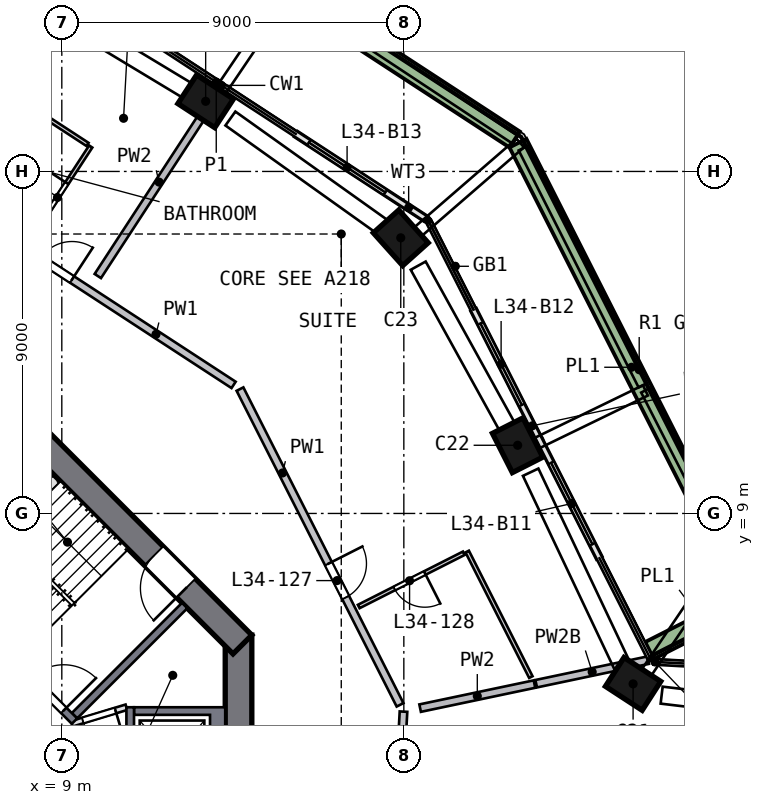
"""IFC4 building model, lengths in metres.
Left out: names, types, materials, properties, quantities, classifications, styles, units other than length and angle.
Written with IfcOpenShell. Run it as: python <this file> out.ifc"""

import sys

from ifc_helpers import new_model, si_unit, direction, frame, frame_2d, origin, origin_2d, place, context, subcontext, project, spatial, polyline, rectangle, outline, extrude, element, fill, save


model = new_model("IFC4")
c1 = context("Model", 3, precision=1e-05, world=origin(), true_north=direction((0.0, 1.0)))
c2 = subcontext(c1, "Body", "Model", "MODEL_VIEW")
j1 = project(units=[si_unit("LENGTHUNIT", "METRE"), si_unit("PLANEANGLEUNIT", "RADIAN")], contexts=[c1])
p1 = place(None, origin())
s1 = spatial("IfcSite", under=j1, at=p1, CompositionType="ELEMENT")
p2 = place(p1, origin())
s2 = spatial("IfcBuilding", under=s1, at=p2, CompositionType="ELEMENT")
p3 = place(p2, frame((0.0, 0.0, 143.5)))
s3 = spatial("IfcBuildingStorey", under=s2, at=p3, CompositionType="ELEMENT", Elevation=143.5)
p4 = place(p3, frame((24.059, 4.377, 0.0), z_axis=(-0.021740335, 0.11425078, 0.993214034), x_axis=(0.838339949, -0.539190255, 0.080374114)))
e1 = element("IfcColumn", 1, at=p4, inside=s3, PredefinedType="COLUMN", context=c2, shape_type="SweptSolid", body=[
    extrude(rectangle(XDim=1.15, YDim=0.9, at=origin_2d()), origin(), (0.0, 0.0, 1.0), 3.212),
])
p5 = place(p3, frame((21.058, 10.674, 0.0), z_axis=(-0.051637931, 0.099777564, 0.99366894), x_axis=(-0.449211123, 0.88633415, -0.112343851)))
e2 = element("IfcColumn", 2, at=p5, inside=s3, PredefinedType="COLUMN", context=c2, shape_type="SweptSolid", body=[
    extrude(rectangle(XDim=1.15, YDim=0.9, at=origin_2d()), origin(), (0.0, 0.0, 1.0), 3.21),
])
p6 = place(p3, frame((18.012, 16.15, 0.0), z_axis=(-0.077471201, 0.084997843, 0.993364777), x_axis=(0.662900147, -0.739822895, 0.115002085)))
e3 = element("IfcColumn", 3, at=p6, inside=s3, PredefinedType="COLUMN", context=c2, shape_type="SweptSolid", body=[
    extrude(rectangle(XDim=1.15, YDim=0.9, at=origin_2d()), origin(), (0.0, 0.0, 1.0), 3.211),
])
p7 = place(p3, frame((12.899, 19.773, 0.0), z_axis=(-0.094531133, 0.060536429, 0.993679629), x_axis=(-0.832224418, 0.54295729, -0.112249269)))
e4 = element("IfcColumn", 4, at=p7, inside=s3, PredefinedType="COLUMN", context=c2, shape_type="SweptSolid", body=[
    extrude(rectangle(XDim=1.15, YDim=0.9, at=origin_2d()), origin(), (0.0, 0.0, 1.0), 3.21),
])
p8 = place(p3, frame((13.65, -5.799, 0.0), z_axis=(0.0, 0.0, 1.0), x_axis=(0.0, 1.0, 0.0)))
e5 = element("IfcWall", 5, at=p8, inside=s3, PredefinedType="SHEAR", context=c2, shape_type="SweptSolid", body=[
    extrude(rectangle(XDim=11.598, YDim=0.7, at=frame_2d((5.799, 0.0))), origin(), (0.0, 0.0, 1.0), 3.5),
])
p9 = place(p8, frame((4.899, 0.0, 0.0)))
e6 = element("IfcOpeningElement", 6, at=p9, cuts=e5, PredefinedType="OPENING", context=c2, shape_type="SweptSolid", body=[
    extrude(rectangle(XDim=1.8, YDim=2.1, at=frame_2d((0.9, 1.05))), frame((0.0, 0.36, 0.0), z_axis=(0.0, -1.0, 0.0), x_axis=(1.0, 0.0, 0.0)), (0.0, 0.0, 1.0), 0.72),
])
p10 = place(p3, frame((13.752, 5.552, 0.0), z_axis=(0.0, 0.0, 1.0), x_axis=(-0.707106781, 0.707106781, 0.0)))
e7 = element("IfcWall", 7, at=p10, inside=s3, PredefinedType="SHEAR", context=c2, shape_type="SweptSolid", body=[
    extrude(rectangle(XDim=11.598, YDim=0.7, at=frame_2d((5.799, 0.0))), origin(), (0.0, 0.0, 1.0), 3.5),
])
p11 = place(p10, frame((2.099, 0.0, 0.0)))
e8 = element("IfcOpeningElement", 8, at=p11, cuts=e7, PredefinedType="OPENING", context=c2, shape_type="SweptSolid", body=[
    extrude(rectangle(XDim=1.2, YDim=2.1, at=frame_2d((0.6, 1.05))), frame((0.0, 0.36, 0.0), z_axis=(0.0, -1.0, 0.0), x_axis=(1.0, 0.0, 0.0)), (0.0, 0.0, 1.0), 0.72),
])
p12 = place(p3, frame((23.142, 7.834, 0.0), z_axis=(0.0, 0.0, 1.0), x_axis=(-0.452096723, 0.891968919, 0.0)))
e9 = element("IfcWall", 9, at=p12, inside=s3, PredefinedType="SOLIDWALL", context=c2, shape_type="SweptSolid", body=[
    extrude(rectangle(XDim=3.475, YDim=0.15, at=frame_2d((1.738, 0.0))), origin(), (0.0, 0.0, 1.0), 2.475),
])
p13 = place(p12, frame((0.4, 0.0, 0.0)))
e10 = element("IfcOpeningElement", 10, at=p13, cuts=e9, PredefinedType="OPENING", context=c2, shape_type="SweptSolid", body=[
    extrude(rectangle(XDim=2.4, YDim=2.4, at=frame_2d((1.2, 1.2))), frame((0.0, 0.085, 0.0), z_axis=(0.0, -1.0, 0.0), x_axis=(1.0, 0.0, 0.0)), (0.0, 0.0, 1.0), 0.17),
])
p14 = place(p3, frame((21.571, 10.934, 0.0), z_axis=(0.0, 0.0, 1.0), x_axis=(-0.452120787, 0.891956722, 0.0)))
e11 = element("IfcWall", 11, at=p14, inside=s3, PredefinedType="SOLIDWALL", context=c2, shape_type="SweptSolid", body=[
    extrude(rectangle(XDim=3.835, YDim=0.15, at=frame_2d((1.918, 0.0))), origin(), (0.0, 0.0, 1.0), 2.475),
])
p15 = place(p14, frame((1.035, 0.0, 0.0)))
e12 = element("IfcOpeningElement", 12, at=p15, cuts=e11, PredefinedType="OPENING", context=c2, shape_type="SweptSolid", body=[
    extrude(rectangle(XDim=2.4, YDim=2.4, at=frame_2d((1.2, 1.2))), frame((0.0, 0.085, 0.0), z_axis=(0.0, -1.0, 0.0), x_axis=(1.0, 0.0, 0.0)), (0.0, 0.0, 1.0), 0.17),
])
p16 = place(p3, frame((18.574, 16.757, 0.0), z_axis=(0.0, 0.0, 1.0), x_axis=(-0.837530592, 0.546390434, 0.0)))
e13 = element("IfcWall", 13, at=p16, inside=s3, PredefinedType="SOLIDWALL", context=c2, shape_type="SweptSolid", body=[
    extrude(rectangle(XDim=4.068, YDim=0.15, at=frame_2d((2.034, 0.0))), origin(), (0.0, 0.0, 1.0), 2.475),
])
p17 = place(p16, frame((1.268, 0.0, 0.0)))
e14 = element("IfcOpeningElement", 14, at=p17, cuts=e13, PredefinedType="OPENING", context=c2, shape_type="SweptSolid", body=[
    extrude(rectangle(XDim=2.4, YDim=2.4, at=frame_2d((1.2, 1.2))), frame((0.0, 0.085, 0.0), z_axis=(0.0, -1.0, 0.0), x_axis=(1.0, 0.0, 0.0)), (0.0, 0.0, 1.0), 0.17),
])
p18 = place(p3, frame((24.464, 5.394, 0.0), z_axis=(0.0, 0.0, 1.0), x_axis=(0.89195617, 0.452121875, 0.0)))
e15 = element("IfcWall", 15, at=p18, inside=s3, PredefinedType="SOLIDWALL", context=c2, shape_type="SweptSolid", body=[
    extrude(rectangle(XDim=3.199, YDim=0.5, at=frame_2d((1.6, 0.0))), origin(), (0.0, 0.0, 1.0), 0.7),
])
p19 = place(p3, frame((26.981, 6.95, 0.0), z_axis=(0.0, 0.0, 1.0), x_axis=(-0.452125212, 0.891954479, 0.0)))
e16 = element("IfcWall", 16, at=p19, inside=s3, PredefinedType="SOLIDWALL", context=c2, shape_type="SweptSolid", body=[
    extrude(rectangle(XDim=13.224, YDim=0.5, at=frame_2d((6.612, 0.0))), origin(), (0.0, 0.0, 1.0), 0.7),
])
p20 = place(p3, frame((20.916, 18.841, 0.0), z_axis=(0.0, 0.0, 1.0), x_axis=(-0.837521399, 0.546404526, 0.0)))
e17 = element("IfcWall", 17, at=p20, inside=s3, PredefinedType="SOLIDWALL", context=c2, shape_type="SweptSolid", body=[
    extrude(rectangle(XDim=13.723, YDim=0.5, at=frame_2d((6.862, 0.0))), origin(), (0.0, 0.0, 1.0), 0.7),
])
p21 = place(p3, origin())
e18 = element("IfcWall", 18, at=p21, inside=s3, PredefinedType="SOLIDWALL", context=c2, shape_type="SweptSolid", body=[
    extrude(outline(polyline([(13.3, 3.9), (13.3, 1.2), (10.9, 1.2), (10.9, 1.4), (12.9, 1.4), (12.9, 3.7), (10.9, 3.7), (10.9, 3.9), (13.3, 3.9)])), origin(), (0.0, 0.0, 1.0), 3.19),
])
p22 = place(p3, frame((10.8, 1.2, 0.0), z_axis=(0.0, 0.0, 1.0), x_axis=(0.0, 1.0, 0.0)))
e19 = element("IfcWall", 19, at=p22, inside=s3, PredefinedType="SOLIDWALL", context=c2, shape_type="SweptSolid", body=[
    extrude(rectangle(XDim=2.7, YDim=0.2, at=frame_2d((1.35, 0.0))), origin(), (0.0, 0.0, 1.0), 3.19),
])
p23 = place(p22, frame((0.75, 0.0, 0.0)))
e20 = element("IfcOpeningElement", 20, at=p23, cuts=e19, PredefinedType="OPENING", context=c2, shape_type="SweptSolid", body=[
    extrude(rectangle(XDim=1.2, YDim=2.1, at=frame_2d((0.6, 1.05))), frame((0.0, 0.11, 0.0), z_axis=(0.0, -1.0, 0.0), x_axis=(1.0, 0.0, 0.0)), (0.0, 0.0, 1.0), 0.22),
])
p24 = place(p3, frame((3.535, 9.334, 0.0), z_axis=(0.0, 0.0, 1.0), x_axis=(0.707106781, -0.707106781, 0.0)))
e21 = element("IfcWall", 21, at=p24, inside=s3, PredefinedType="SOLIDWALL", context=c2, shape_type="SweptSolid", body=[
    extrude(rectangle(XDim=8.2, YDim=0.2, at=frame_2d((4.1, 0.0))), origin(), (0.0, 0.0, 1.0), 3.19),
])
p25 = place(p24, frame((6.6, 0.0, 0.0)))
e22 = element("IfcOpeningElement", 22, at=p25, cuts=e21, PredefinedType="OPENING", context=c2, shape_type="SweptSolid", body=[
    extrude(rectangle(XDim=1.2, YDim=2.1, at=frame_2d((0.6, 1.05))), frame((0.0, 0.11, 0.0), z_axis=(0.0, -1.0, 0.0), x_axis=(1.0, 0.0, 0.0)), (0.0, 0.0, 1.0), 0.22),
])
p26 = place(p3, frame((9.334, 3.677, 0.0), z_axis=(0.0, 0.0, 1.0), x_axis=(0.707106781, 0.707106781, 0.0)))
e23 = element("IfcWall", 23, at=p26, inside=s3, PredefinedType="SOLIDWALL", context=c2, shape_type="SweptSolid", body=[
    extrude(rectangle(XDim=4.1, YDim=0.2, at=frame_2d((2.05, 0.0))), origin(), (0.0, 0.0, 1.0), 3.19),
])
p27 = place(p3, frame((10.7, 3.9, 0.0), z_axis=(0.0, 0.0, 1.0), x_axis=(-0.957084567, -0.289808785, 0.0)))
e24 = element("IfcWall", 24, at=p27, inside=s3, PredefinedType="PARTITIONING", context=c2, shape_type="SweptSolid", body=[
    extrude(rectangle(XDim=1.501, YDim=0.15, at=frame_2d((0.75, 0.0))), origin(), (0.0, 0.0, 1.0), 3.19),
])
p28 = place(p27, frame((0.301, 0.0, 0.0)))
e25 = element("IfcOpeningElement", 25, at=p28, cuts=e24, PredefinedType="OPENING", context=c2, shape_type="SweptSolid", body=[
    extrude(rectangle(XDim=0.9, YDim=2.1, at=frame_2d((0.45, 1.05))), frame((0.0, 0.085, 0.0), z_axis=(0.0, -1.0, 0.0), x_axis=(1.0, 0.0, 0.0)), (0.0, 0.0, 1.0), 0.17),
])
p29 = place(p3, frame((5.701, 17.484, 0.0), z_axis=(0.0, 0.0, 1.0), x_axis=(0.83752891, -0.546393013, 0.0)))
e26 = element("IfcWall", 26, at=p29, inside=s3, PredefinedType="SOLIDWALL", context=c2, shape_type="SweptSolid", body=[
    extrude(rectangle(XDim=9.336, YDim=0.2, at=frame_2d((4.668, 0.0))), origin(), (0.0, 0.0, 1.0), 3.19),
])
p30 = place(p29, frame((3.26, 0.0, 0.0)))
e27 = element("IfcOpeningElement", 27, at=p30, cuts=e26, PredefinedType="OPENING", context=c2, shape_type="SweptSolid", body=[
    extrude(rectangle(XDim=1.0, YDim=2.1, at=frame_2d((0.5, 1.05))), frame((0.0, 0.11, 0.0), z_axis=(0.0, -1.0, 0.0), x_axis=(1.0, 0.0, 0.0)), (0.0, 0.0, 1.0), 0.22),
])
p31 = place(p3, frame((13.688, 12.273, 0.0), z_axis=(0.0, 0.0, 1.0), x_axis=(0.452112705, -0.891960818, 0.0)))
e28 = element("IfcWall", 28, at=p31, inside=s3, PredefinedType="SOLIDWALL", context=c2, shape_type="SweptSolid", body=[
    extrude(rectangle(XDim=9.316, YDim=0.2, at=frame_2d((4.658, 0.0))), origin(), (0.0, 0.0, 1.0), 3.19),
])
p32 = place(p31, frame((5.15, 0.0, 0.0)))
e29 = element("IfcOpeningElement", 29, at=p32, cuts=e28, PredefinedType="OPENING", context=c2, shape_type="SweptSolid", body=[
    extrude(rectangle(XDim=1.0, YDim=2.1, at=frame_2d((0.5, 1.05))), frame((0.0, 0.11, 0.0), z_axis=(0.0, -1.0, 0.0), x_axis=(1.0, 0.0, 0.0)), (0.0, 0.0, 1.0), 0.22),
])
p33 = place(p3, frame((17.803, 0.332, 0.0), z_axis=(0.0, 0.0, 1.0), x_axis=(0.054429939, 0.998517592, 0.0)))
e30 = element("IfcWall", 30, at=p33, inside=s3, PredefinedType="SOLIDWALL", context=c2, shape_type="SweptSolid", body=[
    extrude(rectangle(XDim=3.458, YDim=0.2, at=frame_2d((1.729, 0.0))), origin(), (0.0, 0.0, 1.0), 3.19),
])
p34 = place(p3, frame((9.948, 15.248, 0.0), z_axis=(0.0, 0.0, 1.0), x_axis=(0.546387636, 0.837532418, 0.0)))
e31 = element("IfcWall", 31, at=p34, inside=s3, PredefinedType="SOLIDWALL", context=c2, shape_type="SweptSolid", body=[
    extrude(rectangle(XDim=5.903, YDim=0.2, at=frame_2d((2.951, 0.0))), origin(), (0.0, 0.0, 1.0), 3.19),
])
p35 = place(p3, frame((18.429, 3.877, 0.0), z_axis=(0.0, 0.0, 1.0), x_axis=(0.97857421, 0.205894428, 0.0)))
e32 = element("IfcWall", 32, at=p35, inside=s3, PredefinedType="SOLIDWALL", context=c2, shape_type="SweptSolid", body=[
    extrude(rectangle(XDim=3.075, YDim=0.2, at=frame_2d((1.537, 0.0))), origin(), (0.0, 0.0, 1.0), 3.19),
])
p36 = place(p3, frame((21.482, 4.519, 0.0), z_axis=(0.0, 0.0, 1.0), x_axis=(0.978586756, 0.205834792, 0.0)))
e33 = element("IfcWall", 33, at=p36, inside=s3, PredefinedType="SOLIDWALL", context=c2, shape_type="SweptSolid", body=[
    extrude(rectangle(XDim=3.011, YDim=0.2, at=frame_2d((1.506, 0.0))), origin(), (0.0, 0.0, 1.0), 2.69),
])
p37 = place(p3, frame((7.586, 20.075, 0.0), z_axis=(0.0, 0.0, 1.0), x_axis=(0.837560013, -0.546345335, 0.0)))
e34 = element("IfcWall", 34, at=p37, inside=s3, PredefinedType="PARTITIONING", context=c2, shape_type="SweptSolid", body=[
    extrude(rectangle(XDim=2.497, YDim=0.1, at=frame_2d((1.248, 0.0))), origin(), (0.0, 0.0, 1.0), 3.19),
])
p38 = place(p3, frame((8.122, 16.143, 0.0), z_axis=(0.0, 0.0, 1.0), x_axis=(0.546372035, 0.837542595, 0.0)))
e35 = element("IfcWall", 35, at=p38, inside=s3, PredefinedType="PARTITIONING", context=c2, shape_type="SweptSolid", body=[
    extrude(rectangle(XDim=3.0, YDim=0.1, at=frame_2d((1.5, 0.0))), origin(), (0.0, 0.0, 1.0), 3.19),
])
p39 = place(p38, frame((0.95, 0.0, 0.0)))
e36 = element("IfcOpeningElement", 36, at=p39, cuts=e35, PredefinedType="OPENING", context=c2, shape_type="SweptSolid", body=[
    extrude(rectangle(XDim=0.9, YDim=2.1, at=frame_2d((0.45, 1.05))), frame((0.0, 0.06, 0.0), z_axis=(0.0, -1.0, 0.0), x_axis=(1.0, 0.0, 0.0)), (0.0, 0.0, 1.0), 0.12),
])
p40 = place(p3, frame((19.578, 7.953, 0.0), z_axis=(0.0, 0.0, 1.0), x_axis=(-0.891956597, -0.452121033, 0.0)))
e37 = element("IfcWall", 37, at=p40, inside=s3, PredefinedType="PARTITIONING", context=c2, shape_type="SweptSolid", body=[
    extrude(rectangle(XDim=3.1, YDim=0.1, at=frame_2d((1.55, 0.0))), origin(), (0.0, 0.0, 1.0), 3.19),
])
p41 = place(p40, frame((1.15, 0.0, 0.0)))
e38 = element("IfcOpeningElement", 38, at=p41, cuts=e37, PredefinedType="OPENING", context=c2, shape_type="SweptSolid", body=[
    extrude(rectangle(XDim=0.9, YDim=2.1, at=frame_2d((0.45, 1.05))), frame((0.0, 0.06, 0.0), z_axis=(0.0, -1.0, 0.0), x_axis=(1.0, 0.0, 0.0)), (0.0, 0.0, 1.0), 0.12),
])
p42 = place(p3, frame((19.667, 7.998, 0.0), z_axis=(0.0, 0.0, 1.0), x_axis=(0.452110949, -0.891961709, 0.0)))
e39 = element("IfcWall", 39, at=p42, inside=s3, PredefinedType="PARTITIONING", context=c2, shape_type="SweptSolid", body=[
    extrude(rectangle(XDim=3.704, YDim=0.1, at=frame_2d((1.852, 0.0))), origin(), (0.0, 0.0, 1.0), 3.19),
])
p43 = place(p13, origin())
e40 = element("IfcDoor", 40, at=p43, inside=s3, OperationType="SLIDING_TO_RIGHT", PredefinedType="DOOR", context=c2, shape_type="SweptSolid", body=[
    extrude(rectangle(XDim=2.4, YDim=2.4, at=frame_2d((1.2, 1.2))), frame((0.0, 0.025, 0.0), z_axis=(0.0, -1.0, 0.0), x_axis=(1.0, 0.0, 0.0)), (0.0, 0.0, 1.0), 0.05),
])
fill(e10, e40)
p44 = place(p15, origin())
e41 = element("IfcDoor", 41, at=p44, inside=s3, OperationType="SLIDING_TO_LEFT", PredefinedType="DOOR", context=c2, shape_type="SweptSolid", body=[
    extrude(rectangle(XDim=2.4, YDim=2.4, at=frame_2d((1.2, 1.2))), frame((0.0, 0.025, 0.0), z_axis=(0.0, -1.0, 0.0), x_axis=(1.0, 0.0, 0.0)), (0.0, 0.0, 1.0), 0.05),
])
fill(e12, e41)
p45 = place(p17, origin())
e42 = element("IfcDoor", 42, at=p45, inside=s3, OperationType="SLIDING_TO_LEFT", PredefinedType="DOOR", context=c2, shape_type="SweptSolid", body=[
    extrude(rectangle(XDim=2.4, YDim=2.4, at=frame_2d((1.2, 1.2))), frame((0.0, 0.025, 0.0), z_axis=(0.0, -1.0, 0.0), x_axis=(1.0, 0.0, 0.0)), (0.0, 0.0, 1.0), 0.05),
])
fill(e14, e42)
p46 = place(p25, origin())
e43 = element("IfcDoor", 43, at=p46, inside=s3, OperationType="SINGLE_SWING_RIGHT", PredefinedType="DOOR", context=c2, shape_type="SweptSolid", body=[
    extrude(rectangle(XDim=1.2, YDim=2.1, at=frame_2d((0.6, 1.05))), frame((0.0, 0.025, 0.0), z_axis=(0.0, -1.0, 0.0), x_axis=(1.0, 0.0, 0.0)), (0.0, 0.0, 1.0), 0.05),
])
fill(e22, e43)
p47 = place(p11, origin())
e44 = element("IfcDoor", 44, at=p47, inside=s3, OperationType="SINGLE_SWING_LEFT", PredefinedType="DOOR", context=c2, shape_type="SweptSolid", body=[
    extrude(rectangle(XDim=1.2, YDim=2.1, at=frame_2d((0.6, 1.05))), frame((0.0, 0.025, 0.0), z_axis=(0.0, -1.0, 0.0), x_axis=(1.0, 0.0, 0.0)), (0.0, 0.0, 1.0), 0.05),
])
fill(e8, e44)
p48 = place(p28, origin())
e45 = element("IfcDoor", 45, at=p48, inside=s3, OperationType="SINGLE_SWING_LEFT", PredefinedType="DOOR", context=c2, shape_type="SweptSolid", body=[
    extrude(rectangle(XDim=0.9, YDim=2.1, at=frame_2d((0.45, 1.05))), frame((0.0, 0.025, 0.0), z_axis=(0.0, -1.0, 0.0), x_axis=(1.0, 0.0, 0.0)), (0.0, 0.0, 1.0), 0.05),
])
fill(e25, e45)
p49 = place(p32, origin())
e46 = element("IfcDoor", 46, at=p49, inside=s3, OperationType="SINGLE_SWING_LEFT", PredefinedType="DOOR", context=c2, shape_type="SweptSolid", body=[
    extrude(rectangle(XDim=1.0, YDim=2.1, at=frame_2d((0.5, 1.05))), frame((0.0, 0.025, 0.0), z_axis=(0.0, -1.0, 0.0), x_axis=(1.0, 0.0, 0.0)), (0.0, 0.0, 1.0), 0.05),
])
fill(e29, e46)
p50 = place(p41, origin())
e47 = element("IfcDoor", 47, at=p50, inside=s3, OperationType="SINGLE_SWING_LEFT", PredefinedType="DOOR", context=c2, shape_type="SweptSolid", body=[
    extrude(rectangle(XDim=0.9, YDim=2.1, at=frame_2d((0.45, 1.05))), frame((0.0, 0.025, 0.0), z_axis=(0.0, -1.0, 0.0), x_axis=(1.0, 0.0, 0.0)), (0.0, 0.0, 1.0), 0.05),
])
fill(e38, e47)
p51 = place(p30, origin())
e48 = element("IfcDoor", 48, at=p51, inside=s3, OperationType="SINGLE_SWING_RIGHT", PredefinedType="DOOR", context=c2, shape_type="SweptSolid", body=[
    extrude(rectangle(XDim=1.0, YDim=2.1, at=frame_2d((0.5, 1.05))), frame((0.0, 0.025, 0.0), z_axis=(0.0, -1.0, 0.0), x_axis=(1.0, 0.0, 0.0)), (0.0, 0.0, 1.0), 0.05),
])
fill(e27, e48)
p52 = place(p39, origin())
e49 = element("IfcDoor", 49, at=p52, inside=s3, OperationType="SINGLE_SWING_RIGHT", PredefinedType="DOOR", context=c2, shape_type="SweptSolid", body=[
    extrude(rectangle(XDim=0.9, YDim=2.1, at=frame_2d((0.45, 1.05))), frame((0.0, 0.025, 0.0), z_axis=(0.0, -1.0, 0.0), x_axis=(1.0, 0.0, 0.0)), (0.0, 0.0, 1.0), 0.05),
])
fill(e36, e49)
save(model, sys.argv[1])
